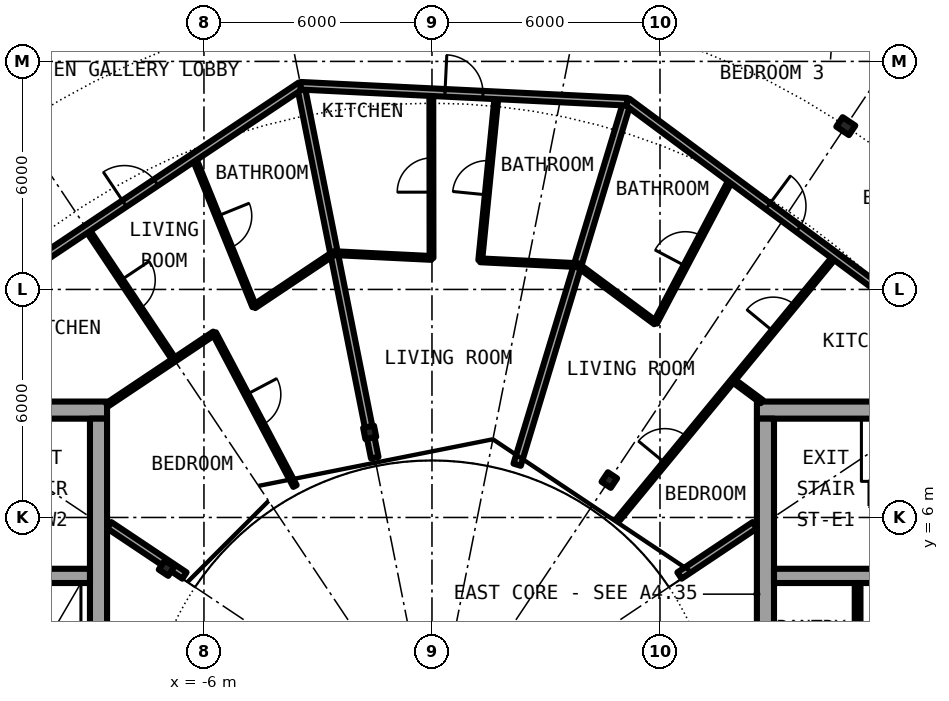
"""IFC4 building model, lengths in metres.
Left out: names, types, materials, properties, quantities, classifications, styles, units other than length and angle.
Written with IfcOpenShell. Run it as: python <this file> out.ifc"""

import sys

from ifc_helpers import new_model, si_unit, direction, frame, frame_2d, origin, origin_2d, place, context, subcontext, project, spatial, rectangle, i_section, extrude, element, fill, save


model = new_model("IFC4")
c1 = context("Model", 3, precision=1e-05, world=origin(), true_north=direction((0.0, 1.0)))
c2 = subcontext(c1, "Body", "Model", "MODEL_VIEW")
j1 = project(units=[si_unit("LENGTHUNIT", "METRE"), si_unit("PLANEANGLEUNIT", "RADIAN")], contexts=[c1])
p1 = place(None, origin())
s1 = spatial("IfcSite", under=j1, at=p1, CompositionType="ELEMENT")
p2 = place(p1, origin())
s2 = spatial("IfcBuilding", under=s1, at=p2, CompositionType="ELEMENT")
p3 = place(p2, frame((0.0, 0.0, 190.2)))
s3 = spatial("IfcBuildingStorey", under=s2, at=p3, CompositionType="ELEMENT", Elevation=190.2)
p4 = place(p3, frame((10.889, 16.297, 0.0), z_axis=(0.0, 0.0, 1.0), x_axis=(0.55557023302, 0.831469612303, 0.0)))
e1 = element("IfcColumn", 1, at=p4, inside=s3, PredefinedType="COLUMN", context=c2, shape_type="SweptSolid", body=[
    extrude(i_section(OverallWidth=0.3, OverallDepth=0.4, WebThickness=0.013, FlangeThickness=0.024, FilletRadius=0.027, at=origin_2d()), origin(), (0.0, 0.0, 1.0), 3.05),
])
for number, where, z_axis, x_axis in (
    (2, (4.667, 6.984, 0.0), (0.0, 0.0, 1.0), (0.556, 0.831, 0.0)),
    (3, (-1.639, 8.239, 0.0), (0.0, 0.0, 1.0), (-0.195, 0.981, 0.0)),
    (4, (-6.984, 4.667, 0.0), (0.0, 0.0, 1.0), (-0.831, 0.556, 0.0)),
):
    element("IfcColumn", number, at=place(p3, frame(where, z_axis=z_axis, x_axis=x_axis)), inside=s3, PredefinedType="COLUMN", context=c2, shape_type="SweptSolid", body=[
        extrude(i_section(OverallWidth=0.3, OverallDepth=0.29, WebThickness=0.009, FlangeThickness=0.014, FilletRadius=0.027, at=origin_2d()), origin(), (0.0, 0.0, 1.0), 3.05),
    ])
p5 = place(p3, frame((22.05, 8.825, 0.0), z_axis=(0.0, 0.0, 1.0), x_axis=(-1.0, 0.0, 0.0)))
e5 = element("IfcWall", 5, at=p5, inside=s3, PredefinedType="SHEAR", context=c2, shape_type="SweptSolid", body=[
    extrude(rectangle(XDim=13.5, YDim=0.45, at=frame_2d((6.75, 0.0))), origin(), (0.0, 0.0, 1.0), 3.05),
])
p6 = place(p5, frame((0.975, 0.0, 0.0)))
e6 = element("IfcOpeningElement", 6, at=p6, cuts=e5, PredefinedType="OPENING", context=c2, shape_type="SweptSolid", body=[
    extrude(rectangle(XDim=1.2, YDim=2.3, at=frame_2d((0.6, 1.15))), frame((0.0, 0.235, 0.0), z_axis=(0.0, -1.0, 0.0), x_axis=(1.0, 0.0, 0.0)), (0.0, 0.0, 1.0), 0.47),
])
p7 = place(p3, frame((8.775, -8.6, 0.0), z_axis=(0.0, 0.0, 1.0), x_axis=(0.0, 1.0, 0.0)))
e7 = element("IfcWall", 7, at=p7, inside=s3, PredefinedType="SHEAR", context=c2, shape_type="SweptSolid", body=[
    extrude(rectangle(XDim=17.2, YDim=0.45, at=frame_2d((8.6, 0.0))), origin(), (0.0, 0.0, 1.0), 3.05),
])
p8 = place(p7, frame((7.4, 0.0, 0.1)))
e8 = element("IfcOpeningElement", 8, at=p8, cuts=e7, PredefinedType="OPENING", context=c2, shape_type="SweptSolid", body=[
    extrude(rectangle(XDim=2.4, YDim=2.2, at=frame_2d((1.2, 1.1))), frame((0.0, 0.235, 0.0), z_axis=(0.0, -1.0, 0.0), x_axis=(1.0, 0.0, 0.0)), (0.0, 0.0, 1.0), 0.47),
])
p9 = place(p3, frame((9.0, 4.462, 0.0), z_axis=(0.0, 0.0, 1.0), x_axis=(1.0, 0.0, 0.0)))
e9 = element("IfcWall", 9, at=p9, inside=s3, PredefinedType="SHEAR", context=c2, shape_type="SweptSolid", body=[
    extrude(rectangle(XDim=10.15, YDim=0.375, at=frame_2d((5.075, 0.0))), origin(), (0.0, 0.0, 1.0), 3.05),
])
p10 = place(p9, frame((6.6, 0.0, 0.0)))
e10 = element("IfcOpeningElement", 10, at=p10, cuts=e9, PredefinedType="OPENING", context=c2, shape_type="SweptSolid", body=[
    extrude(rectangle(XDim=1.1, YDim=2.3, at=frame_2d((0.55, 1.15))), frame((0.0, 0.198, 0.0), z_axis=(0.0, -1.0, 0.0), x_axis=(1.0, 0.0, 0.0)), (0.0, 0.0, 1.0), 0.395),
])
p11 = place(p3, frame((11.2, 1.825, 0.0), z_axis=(0.0, 0.0, 1.0), x_axis=(0.0, 1.0, 0.0)))
e11 = element("IfcWall", 11, at=p11, inside=s3, PredefinedType="PARTITIONING", context=c2, shape_type="SweptSolid", body=[
    extrude(rectangle(XDim=2.45, YDim=0.15, at=frame_2d((1.225, 0.0))), origin(), (0.0, 0.0, 1.0), 2.7),
])
p12 = place(p3, frame((-8.55, 8.825, 0.0), z_axis=(0.0, 0.0, 1.0), x_axis=(-1.0, 0.0, 0.0)))
e12 = element("IfcWall", 12, at=p12, inside=s3, PredefinedType="SHEAR", context=c2, shape_type="SweptSolid", body=[
    extrude(rectangle(XDim=13.5, YDim=0.45, at=frame_2d((6.75, 0.0))), origin(), (0.0, 0.0, 1.0), 3.05),
])
p13 = place(p12, frame((11.325, 0.0, 0.0)))
e13 = element("IfcOpeningElement", 13, at=p13, cuts=e12, PredefinedType="OPENING", context=c2, shape_type="SweptSolid", body=[
    extrude(rectangle(XDim=1.2, YDim=2.3, at=frame_2d((0.6, 1.15))), frame((0.0, 0.235, 0.0), z_axis=(0.0, -1.0, 0.0), x_axis=(1.0, 0.0, 0.0)), (0.0, 0.0, 1.0), 0.47),
])
p14 = place(p3, frame((-8.775, 8.6, 0.0), z_axis=(0.0, 0.0, 1.0), x_axis=(0.0, -1.0, 0.0)))
e14 = element("IfcWall", 14, at=p14, inside=s3, PredefinedType="SHEAR", context=c2, shape_type="SweptSolid", body=[
    extrude(rectangle(XDim=17.2, YDim=0.45, at=frame_2d((8.6, 0.0))), origin(), (0.0, 0.0, 1.0), 3.05),
])
p15 = place(p14, frame((7.4, 0.0, 0.1)))
e15 = element("IfcOpeningElement", 15, at=p15, cuts=e14, PredefinedType="OPENING", context=c2, shape_type="SweptSolid", body=[
    extrude(rectangle(XDim=2.4, YDim=2.2, at=frame_2d((1.2, 1.1))), frame((0.0, 0.235, 0.0), z_axis=(0.0, -1.0, 0.0), x_axis=(1.0, 0.0, 0.0)), (0.0, 0.0, 1.0), 0.47),
])
p16 = place(p3, frame((-9.0, 4.462, 0.0), z_axis=(0.0, 0.0, 1.0), x_axis=(-1.0, 0.0, 0.0)))
e16 = element("IfcWall", 16, at=p16, inside=s3, PredefinedType="SHEAR", context=c2, shape_type="SweptSolid", body=[
    extrude(rectangle(XDim=10.15, YDim=0.375, at=frame_2d((5.075, 0.0))), origin(), (0.0, 0.0, 1.0), 3.05),
])
p17 = place(p3, frame((-9.085, 13.597, 0.0), z_axis=(0.0, 0.0, 1.0), x_axis=(0.555528237031, -0.831497671591, 0.0)))
e17 = element("IfcWall", 17, at=p17, inside=s3, PredefinedType="PARTITIONING", context=c2, shape_type="SweptSolid", body=[
    extrude(rectangle(XDim=4.149, YDim=0.1, at=frame_2d((2.075, 0.0))), origin(), (0.0, 0.0, 1.0), 2.7),
])
p18 = place(p17, frame((1.625, 0.0, 0.0)))
e18 = element("IfcOpeningElement", 18, at=p18, cuts=e17, PredefinedType="OPENING", context=c2, shape_type="SweptSolid", body=[
    extrude(rectangle(XDim=0.9, YDim=2.3, at=frame_2d((0.45, 1.15))), frame((0.0, 0.06, 0.0), z_axis=(0.0, -1.0, 0.0), x_axis=(1.0, 0.0, 0.0)), (0.0, 0.0, 1.0), 0.12),
])
p19 = place(p3, frame((-6.269, 15.478, 0.0), z_axis=(0.0, 0.0, 1.0), x_axis=(0.375509828455, -0.926818411952, 0.0)))
e19 = element("IfcWall", 19, at=p19, inside=s3, PredefinedType="PARTITIONING", context=c2, shape_type="SweptSolid", body=[
    extrude(rectangle(XDim=4.237, YDim=0.1, at=frame_2d((2.119, 0.0))), origin(), (0.0, 0.0, 1.0), 2.7),
])
p20 = place(p19, frame((1.669, 0.0, 0.0)))
e20 = element("IfcOpeningElement", 20, at=p20, cuts=e19, PredefinedType="OPENING", context=c2, shape_type="SweptSolid", body=[
    extrude(rectangle(XDim=0.9, YDim=2.3, at=frame_2d((0.45, 1.15))), frame((0.0, 0.06, 0.0), z_axis=(0.0, -1.0, 0.0), x_axis=(1.0, 0.0, 0.0)), (0.0, 0.0, 1.0), 0.12),
])
p21 = place(p3, frame((-5.729, 10.849, 0.0), z_axis=(0.0, 0.0, 1.0), x_axis=(0.466962677975, -0.884277025246, 0.0)))
e21 = element("IfcWall", 21, at=p21, inside=s3, PredefinedType="PARTITIONING", context=c2, shape_type="SweptSolid", body=[
    extrude(rectangle(XDim=4.549, YDim=0.1, at=frame_2d((2.274, 0.0))), origin(), (0.0, 0.0, 1.0), 2.7),
])
p22 = place(p21, frame((1.824, 0.0, 0.0)))
e22 = element("IfcOpeningElement", 22, at=p22, cuts=e21, PredefinedType="OPENING", context=c2, shape_type="SweptSolid", body=[
    extrude(rectangle(XDim=0.9, YDim=2.3, at=frame_2d((0.45, 1.15))), frame((0.0, 0.06, 0.0), z_axis=(0.0, -1.0, 0.0), x_axis=(1.0, 0.0, 0.0)), (0.0, 0.0, 1.0), 0.12),
])
p23 = place(p3, frame((-3.453, 17.36, 0.0), z_axis=(0.0, 0.0, 1.0), x_axis=(0.195074954737, -0.98078833702, 0.0)))
e23 = element("IfcWall", 23, at=p23, inside=s3, PredefinedType="PARTITIONING", context=c2, shape_type="SweptSolid", body=[
    extrude(rectangle(XDim=9.155, YDim=0.2, at=frame_2d((4.577, 0.0))), origin(), (0.0, 0.0, 1.0), 2.7),
])
p24 = place(p3, frame((-1.611, 8.096, 0.0), z_axis=(0.0, 0.0, 1.0), x_axis=(0.196467585126, -0.980510320188, 0.0)))
e24 = element("IfcWall", 24, at=p24, inside=s3, PredefinedType="PARTITIONING", context=c2, shape_type="SweptSolid", body=[
    extrude(rectangle(XDim=0.534, YDim=0.2, at=frame_2d((0.267, 0.0))), origin(), (0.0, 0.0, 1.0), 2.7),
])
p25 = place(p3, frame((-0.012, 12.829, 0.0), z_axis=(0.0, 0.0, 1.0), x_axis=(-0.001175416181, 0.999999309198, 0.0)))
e25 = element("IfcWall", 25, at=p25, inside=s3, PredefinedType="PARTITIONING", context=c2, shape_type="SweptSolid", body=[
    extrude(rectangle(XDim=4.362, YDim=0.1, at=frame_2d((2.181, 0.0))), origin(), (0.0, 0.0, 1.0), 2.7),
])
p26 = place(p25, frame((1.731, 0.0, 0.0)))
e26 = element("IfcOpeningElement", 26, at=p26, cuts=e25, PredefinedType="OPENING", context=c2, shape_type="SweptSolid", body=[
    extrude(rectangle(XDim=0.9, YDim=2.3, at=frame_2d((0.45, 1.15))), frame((0.0, 0.06, 0.0), z_axis=(0.0, -1.0, 0.0), x_axis=(1.0, 0.0, 0.0)), (0.0, 0.0, 1.0), 0.12),
])
p27 = place(p3, frame((1.27, 12.766, 0.0), z_axis=(0.0, 0.0, 1.0), x_axis=(0.099004993851, 0.9950869365, 0.0)))
e27 = element("IfcWall", 27, at=p27, inside=s3, PredefinedType="PARTITIONING", context=c2, shape_type="SweptSolid", body=[
    extrude(rectangle(XDim=4.362, YDim=0.1, at=frame_2d((2.181, 0.0))), origin(), (0.0, 0.0, 1.0), 2.7),
])
p28 = place(p27, frame((1.731, 0.0, 0.0)))
e28 = element("IfcOpeningElement", 28, at=p28, cuts=e27, PredefinedType="OPENING", context=c2, shape_type="SweptSolid", body=[
    extrude(rectangle(XDim=0.9, YDim=2.3, at=frame_2d((0.45, 1.15))), frame((0.0, 0.06, 0.0), z_axis=(0.0, -1.0, 0.0), x_axis=(1.0, 0.0, 0.0)), (0.0, 0.0, 1.0), 0.12),
])
p29 = place(p3, frame((2.241, 7.388, 0.0), z_axis=(0.0, 0.0, 1.0), x_axis=(0.290284403441, 0.956940418793, 0.0)))
e29 = element("IfcWall", 29, at=p29, inside=s3, PredefinedType="PARTITIONING", context=c2, shape_type="SweptSolid", body=[
    extrude(rectangle(XDim=9.98, YDim=0.2, at=frame_2d((4.99, 0.0))), origin(), (0.0, 0.0, 1.0), 2.7),
])
p30 = place(p3, frame((4.909, 5.958, 0.0), z_axis=(0.0, 0.0, 1.0), x_axis=(0.635879010442, 0.771788756124, 0.0)))
e30 = element("IfcWall", 30, at=p30, inside=s3, PredefinedType="PARTITIONING", context=c2, shape_type="SweptSolid", body=[
    extrude(rectangle(XDim=8.967, YDim=0.1, at=frame_2d((4.484, 0.0))), origin(), (0.0, 0.0, 1.0), 2.7),
])
p31 = place(p30, frame((6.4, 0.0, 0.0)))
e31 = element("IfcOpeningElement", 31, at=p31, cuts=e30, PredefinedType="OPENING", context=c2, shape_type="SweptSolid", body=[
    extrude(rectangle(XDim=0.9, YDim=2.3, at=frame_2d((0.45, 1.15))), frame((0.0, 0.06, 0.0), z_axis=(0.0, -1.0, 0.0), x_axis=(1.0, 0.0, 0.0)), (0.0, 0.0, 1.0), 0.12),
])
p32 = place(p30, frame((1.917, 0.0, 0.0)))
e32 = element("IfcOpeningElement", 32, at=p32, cuts=e30, PredefinedType="OPENING", context=c2, shape_type="SweptSolid", body=[
    extrude(rectangle(XDim=0.9, YDim=2.3, at=frame_2d((0.45, 1.15))), frame((0.0, 0.06, 0.0), z_axis=(0.0, -1.0, 0.0), x_axis=(1.0, 0.0, 0.0)), (0.0, 0.0, 1.0), 0.12),
])
p33 = place(p3, frame((5.877, 11.125, 0.0), z_axis=(0.0, 0.0, 1.0), x_axis=(0.467030118529, 0.884241408432, 0.0)))
e33 = element("IfcWall", 33, at=p33, inside=s3, PredefinedType="PARTITIONING", context=c2, shape_type="SweptSolid", body=[
    extrude(rectangle(XDim=4.278, YDim=0.1, at=frame_2d((2.139, 0.0))), origin(), (0.0, 0.0, 1.0), 2.7),
])
p34 = place(p33, frame((1.689, 0.0, 0.0)))
e34 = element("IfcOpeningElement", 34, at=p34, cuts=e33, PredefinedType="OPENING", context=c2, shape_type="SweptSolid", body=[
    extrude(rectangle(XDim=0.9, YDim=2.3, at=frame_2d((0.45, 1.15))), frame((0.0, 0.06, 0.0), z_axis=(0.0, -1.0, 0.0), x_axis=(1.0, 0.0, 0.0)), (0.0, 0.0, 1.0), 0.12),
])
for number, where, z_axis, x_axis in (
    (35, (-6.513, 4.472, 0.0), (0.0, 0.0, 1.0), (-0.831, 0.556, 0.0)),
    (36, (6.513, 4.472, 0.0), (0.0, 0.0, 1.0), (0.831, 0.556, 0.0)),
):
    element("IfcWall", number, at=place(p3, frame(where, z_axis=z_axis, x_axis=x_axis)), inside=s3, PredefinedType="PARTITIONING", context=c2, shape_type="SweptSolid", body=[
        extrude(rectangle(XDim=2.383, YDim=0.2, at=frame_2d((1.191, 0.0))), origin(), (0.0, 0.0, 1.0), 2.7),
    ])
p35 = place(p3, frame((-8.55, 8.963, 0.0), z_axis=(0.0, 0.0, 1.0), x_axis=(0.83129689803, 0.555828631257, 0.0)))
e37 = element("IfcWall", 37, at=p35, inside=s3, PredefinedType="PARTITIONING", context=c2, shape_type="SweptSolid", body=[
    extrude(rectangle(XDim=3.394, YDim=0.1, at=frame_2d((1.697, 0.0))), origin(), (0.0, 0.0, 1.0), 2.7),
])
p36 = place(p3, frame((-4.678, 11.551, 0.0), z_axis=(0.0, 0.0, 1.0), x_axis=(0.831440395268, 0.555613956912, 0.0)))
e38 = element("IfcWall", 38, at=p36, inside=s3, PredefinedType="PARTITIONING", context=c2, shape_type="SweptSolid", body=[
    extrude(rectangle(XDim=2.527, YDim=0.1, at=frame_2d((1.264, 0.0))), origin(), (0.0, 0.0, 1.0), 2.7),
])
p37 = place(p3, frame((3.834, 12.64, 0.0), z_axis=(0.0, 0.0, 1.0), x_axis=(0.803259509791, -0.595629213463, 0.0)))
e39 = element("IfcWall", 39, at=p37, inside=s3, PredefinedType="PARTITIONING", context=c2, shape_type="SweptSolid", body=[
    extrude(rectangle(XDim=2.543, YDim=0.1, at=frame_2d((1.272, 0.0))), origin(), (0.0, 0.0, 1.0), 2.7),
])
p38 = place(p3, frame((7.922, 9.609, 0.0), z_axis=(0.0, 0.0, 1.0), x_axis=(0.802974061841, -0.596013972999, 0.0)))
e40 = element("IfcWall", 40, at=p38, inside=s3, PredefinedType="PARTITIONING", context=c2, shape_type="SweptSolid", body=[
    extrude(rectangle(XDim=0.943, YDim=0.1, at=frame_2d((0.471, 0.0))), origin(), (0.0, 0.0, 1.0), 2.7),
])
p39 = place(p3, frame((-2.577, 12.955, 0.0), z_axis=(0.0, 0.0, 1.0), x_axis=(0.998796046378, -0.049055659616, 0.0)))
e41 = element("IfcWall", 41, at=p39, inside=s3, PredefinedType="PARTITIONING", context=c2, shape_type="SweptSolid", body=[
    extrude(rectangle(XDim=2.568, YDim=0.1, at=frame_2d((1.284, 0.0))), origin(), (0.0, 0.0, 1.0), 2.7),
])
p40 = place(p3, frame((1.27, 12.766, 0.0), z_axis=(0.0, 0.0, 1.0), x_axis=(0.998790464653, -0.049169174464, 0.0)))
e42 = element("IfcWall", 42, at=p40, inside=s3, PredefinedType="PARTITIONING", context=c2, shape_type="SweptSolid", body=[
    extrude(rectangle(XDim=2.567, YDim=0.1, at=frame_2d((1.284, 0.0))), origin(), (0.0, 0.0, 1.0), 2.7),
])
p41 = place(p3, frame((-14.718, 9.832, 0.0), z_axis=(0.0, 0.0, 1.0), x_axis=(0.831437137577, 0.555618831806, 0.0)))
e43 = element("IfcWall", 43, at=p41, inside=s3, PredefinedType="PARTITIONING", context=c2, shape_type="SweptSolid", body=[
    extrude(rectangle(XDim=13.549, YDim=0.2, at=frame_2d((6.774, 0.0))), origin(), (0.0, 0.0, 1.0), 2.7),
])
p42 = place(p41, frame((7.968, 0.0, 0.0)))
e44 = element("IfcOpeningElement", 44, at=p42, cuts=e43, PredefinedType="OPENING", context=c2, shape_type="SweptSolid", body=[
    extrude(rectangle(XDim=1.0, YDim=2.3, at=frame_2d((0.5, 1.15))), frame((0.0, 0.11, 0.0), z_axis=(0.0, -1.0, 0.0), x_axis=(1.0, 0.0, 0.0)), (0.0, 0.0, 1.0), 0.22),
])
p43 = place(p3, frame((5.137, 16.938, 0.0), z_axis=(0.0, 0.0, 1.0), x_axis=(0.803240181354, -0.595655278712, 0.0)))
e45 = element("IfcWall", 45, at=p43, inside=s3, PredefinedType="PARTITIONING", context=c2, shape_type="SweptSolid", body=[
    extrude(rectangle(XDim=11.928, YDim=0.2, at=frame_2d((5.964, 0.0))), origin(), (0.0, 0.0, 1.0), 2.7),
])
p44 = place(p43, frame((4.612, 0.0, 0.0)))
e46 = element("IfcOpeningElement", 46, at=p44, cuts=e45, PredefinedType="OPENING", context=c2, shape_type="SweptSolid", body=[
    extrude(rectangle(XDim=1.0, YDim=2.3, at=frame_2d((0.5, 1.15))), frame((0.0, 0.11, 0.0), z_axis=(0.0, -1.0, 0.0), x_axis=(1.0, 0.0, 0.0)), (0.0, 0.0, 1.0), 0.22),
])
p45 = place(p3, frame((-3.458, 17.359, 0.0), z_axis=(0.0, 0.0, 1.0), x_axis=(0.998807562286, -0.048820625966, 0.0)))
e47 = element("IfcWall", 47, at=p45, inside=s3, PredefinedType="PARTITIONING", context=c2, shape_type="SweptSolid", body=[
    extrude(rectangle(XDim=8.601, YDim=0.2, at=frame_2d((4.301, 0.0))), origin(), (0.0, 0.0, 1.0), 2.7),
])
p46 = place(p45, frame((3.804, 0.0, 0.0)))
e48 = element("IfcOpeningElement", 48, at=p46, cuts=e47, PredefinedType="OPENING", context=c2, shape_type="SweptSolid", body=[
    extrude(rectangle(XDim=1.0, YDim=2.3, at=frame_2d((0.5, 1.15))), frame((0.0, 0.11, 0.0), z_axis=(0.0, -1.0, 0.0), x_axis=(1.0, 0.0, 0.0)), (0.0, 0.0, 1.0), 0.22),
])
p47 = place(p3, frame((10.512, 19.667, 0.0), z_axis=(0.0, 0.0, 1.0), x_axis=(0.740853508928, -0.671666642248, 0.0)))
e49 = element("IfcWall", 49, at=p47, inside=s3, PredefinedType="PARTITIONING", context=c2, shape_type="SweptSolid", body=[
    extrude(rectangle(XDim=10.84, YDim=0.2, at=frame_2d((5.42, 0.0))), origin(), (0.0, 0.0, 1.0), 2.7),
])
p48 = place(p47, frame((3.293, 0.0, 0.0)))
e50 = element("IfcOpeningElement", 50, at=p48, cuts=e49, PredefinedType="OPENING", context=c2, shape_type="SweptSolid", body=[
    extrude(rectangle(XDim=1.0, YDim=2.3, at=frame_2d((0.5, 1.15))), frame((0.0, 0.11, 0.0), z_axis=(0.0, -1.0, 0.0), x_axis=(1.0, 0.0, 0.0)), (0.0, 0.0, 1.0), 0.22),
])
p49 = place(p44, origin())
e51 = element("IfcDoor", 51, at=p49, inside=s3, OperationType="SINGLE_SWING_LEFT", PredefinedType="DOOR", context=c2, shape_type="SweptSolid", body=[
    extrude(rectangle(XDim=1.0, YDim=2.3, at=frame_2d((0.5, 1.15))), frame((0.0, 0.025, 0.0), z_axis=(0.0, -1.0, 0.0), x_axis=(1.0, 0.0, 0.0)), (0.0, 0.0, 1.0), 0.05),
])
fill(e46, e51)
p50 = place(p34, origin())
e52 = element("IfcDoor", 52, at=p50, inside=s3, OperationType="SINGLE_SWING_RIGHT", PredefinedType="DOOR", context=c2, shape_type="SweptSolid", body=[
    extrude(rectangle(XDim=0.9, YDim=2.3, at=frame_2d((0.45, 1.15))), frame((0.0, 0.025, 0.0), z_axis=(0.0, -1.0, 0.0), x_axis=(1.0, 0.0, 0.0)), (0.0, 0.0, 1.0), 0.05),
])
fill(e34, e52)
p51 = place(p31, origin())
e53 = element("IfcDoor", 53, at=p51, inside=s3, OperationType="SINGLE_SWING_RIGHT", PredefinedType="DOOR", context=c2, shape_type="SweptSolid", body=[
    extrude(rectangle(XDim=0.9, YDim=2.3, at=frame_2d((0.45, 1.15))), frame((0.0, 0.025, 0.0), z_axis=(0.0, -1.0, 0.0), x_axis=(1.0, 0.0, 0.0)), (0.0, 0.0, 1.0), 0.05),
])
fill(e31, e53)
p52 = place(p32, origin())
e54 = element("IfcDoor", 54, at=p52, inside=s3, OperationType="SINGLE_SWING_LEFT", PredefinedType="DOOR", context=c2, shape_type="SweptSolid", body=[
    extrude(rectangle(XDim=0.9, YDim=2.3, at=frame_2d((0.45, 1.15))), frame((0.0, 0.025, 0.0), z_axis=(0.0, -1.0, 0.0), x_axis=(1.0, 0.0, 0.0)), (0.0, 0.0, 1.0), 0.05),
])
fill(e32, e54)
p53 = place(p46, origin())
e55 = element("IfcDoor", 55, at=p53, inside=s3, OperationType="SINGLE_SWING_RIGHT", PredefinedType="DOOR", context=c2, shape_type="SweptSolid", body=[
    extrude(rectangle(XDim=1.0, YDim=2.3, at=frame_2d((0.5, 1.15))), frame((0.0, 0.025, 0.0), z_axis=(0.0, -1.0, 0.0), x_axis=(1.0, 0.0, 0.0)), (0.0, 0.0, 1.0), 0.05),
])
fill(e48, e55)
p54 = place(p28, origin())
e56 = element("IfcDoor", 56, at=p54, inside=s3, OperationType="SINGLE_SWING_LEFT", PredefinedType="DOOR", context=c2, shape_type="SweptSolid", body=[
    extrude(rectangle(XDim=0.9, YDim=2.3, at=frame_2d((0.45, 1.15))), frame((0.0, 0.025, 0.0), z_axis=(0.0, -1.0, 0.0), x_axis=(1.0, 0.0, 0.0)), (0.0, 0.0, 1.0), 0.05),
])
fill(e28, e56)
p55 = place(p26, origin())
e57 = element("IfcDoor", 57, at=p55, inside=s3, OperationType="SINGLE_SWING_RIGHT", PredefinedType="DOOR", context=c2, shape_type="SweptSolid", body=[
    extrude(rectangle(XDim=0.9, YDim=2.3, at=frame_2d((0.45, 1.15))), frame((0.0, 0.025, 0.0), z_axis=(0.0, -1.0, 0.0), x_axis=(1.0, 0.0, 0.0)), (0.0, 0.0, 1.0), 0.05),
])
fill(e26, e57)
p56 = place(p42, origin())
e58 = element("IfcDoor", 58, at=p56, inside=s3, OperationType="SINGLE_SWING_RIGHT", PredefinedType="DOOR", context=c2, shape_type="SweptSolid", body=[
    extrude(rectangle(XDim=1.0, YDim=2.3, at=frame_2d((0.5, 1.15))), frame((0.0, 0.025, 0.0), z_axis=(0.0, -1.0, 0.0), x_axis=(1.0, 0.0, 0.0)), (0.0, 0.0, 1.0), 0.05),
])
fill(e44, e58)
p57 = place(p20, origin())
e59 = element("IfcDoor", 59, at=p57, inside=s3, OperationType="SINGLE_SWING_LEFT", PredefinedType="DOOR", context=c2, shape_type="SweptSolid", body=[
    extrude(rectangle(XDim=0.9, YDim=2.3, at=frame_2d((0.45, 1.15))), frame((0.0, 0.025, 0.0), z_axis=(0.0, -1.0, 0.0), x_axis=(1.0, 0.0, 0.0)), (0.0, 0.0, 1.0), 0.05),
])
fill(e20, e59)
p58 = place(p18, origin())
e60 = element("IfcDoor", 60, at=p58, inside=s3, OperationType="SINGLE_SWING_LEFT", PredefinedType="DOOR", context=c2, shape_type="SweptSolid", body=[
    extrude(rectangle(XDim=0.9, YDim=2.3, at=frame_2d((0.45, 1.15))), frame((0.0, 0.025, 0.0), z_axis=(0.0, -1.0, 0.0), x_axis=(1.0, 0.0, 0.0)), (0.0, 0.0, 1.0), 0.05),
])
fill(e18, e60)
p59 = place(p22, origin())
e61 = element("IfcDoor", 61, at=p59, inside=s3, OperationType="SINGLE_SWING_RIGHT", PredefinedType="DOOR", context=c2, shape_type="SweptSolid", body=[
    extrude(rectangle(XDim=0.9, YDim=2.3, at=frame_2d((0.45, 1.15))), frame((0.0, 0.025, 0.0), z_axis=(0.0, -1.0, 0.0), x_axis=(1.0, 0.0, 0.0)), (0.0, 0.0, 1.0), 0.05),
])
fill(e22, e61)
save(model, sys.argv[1])
